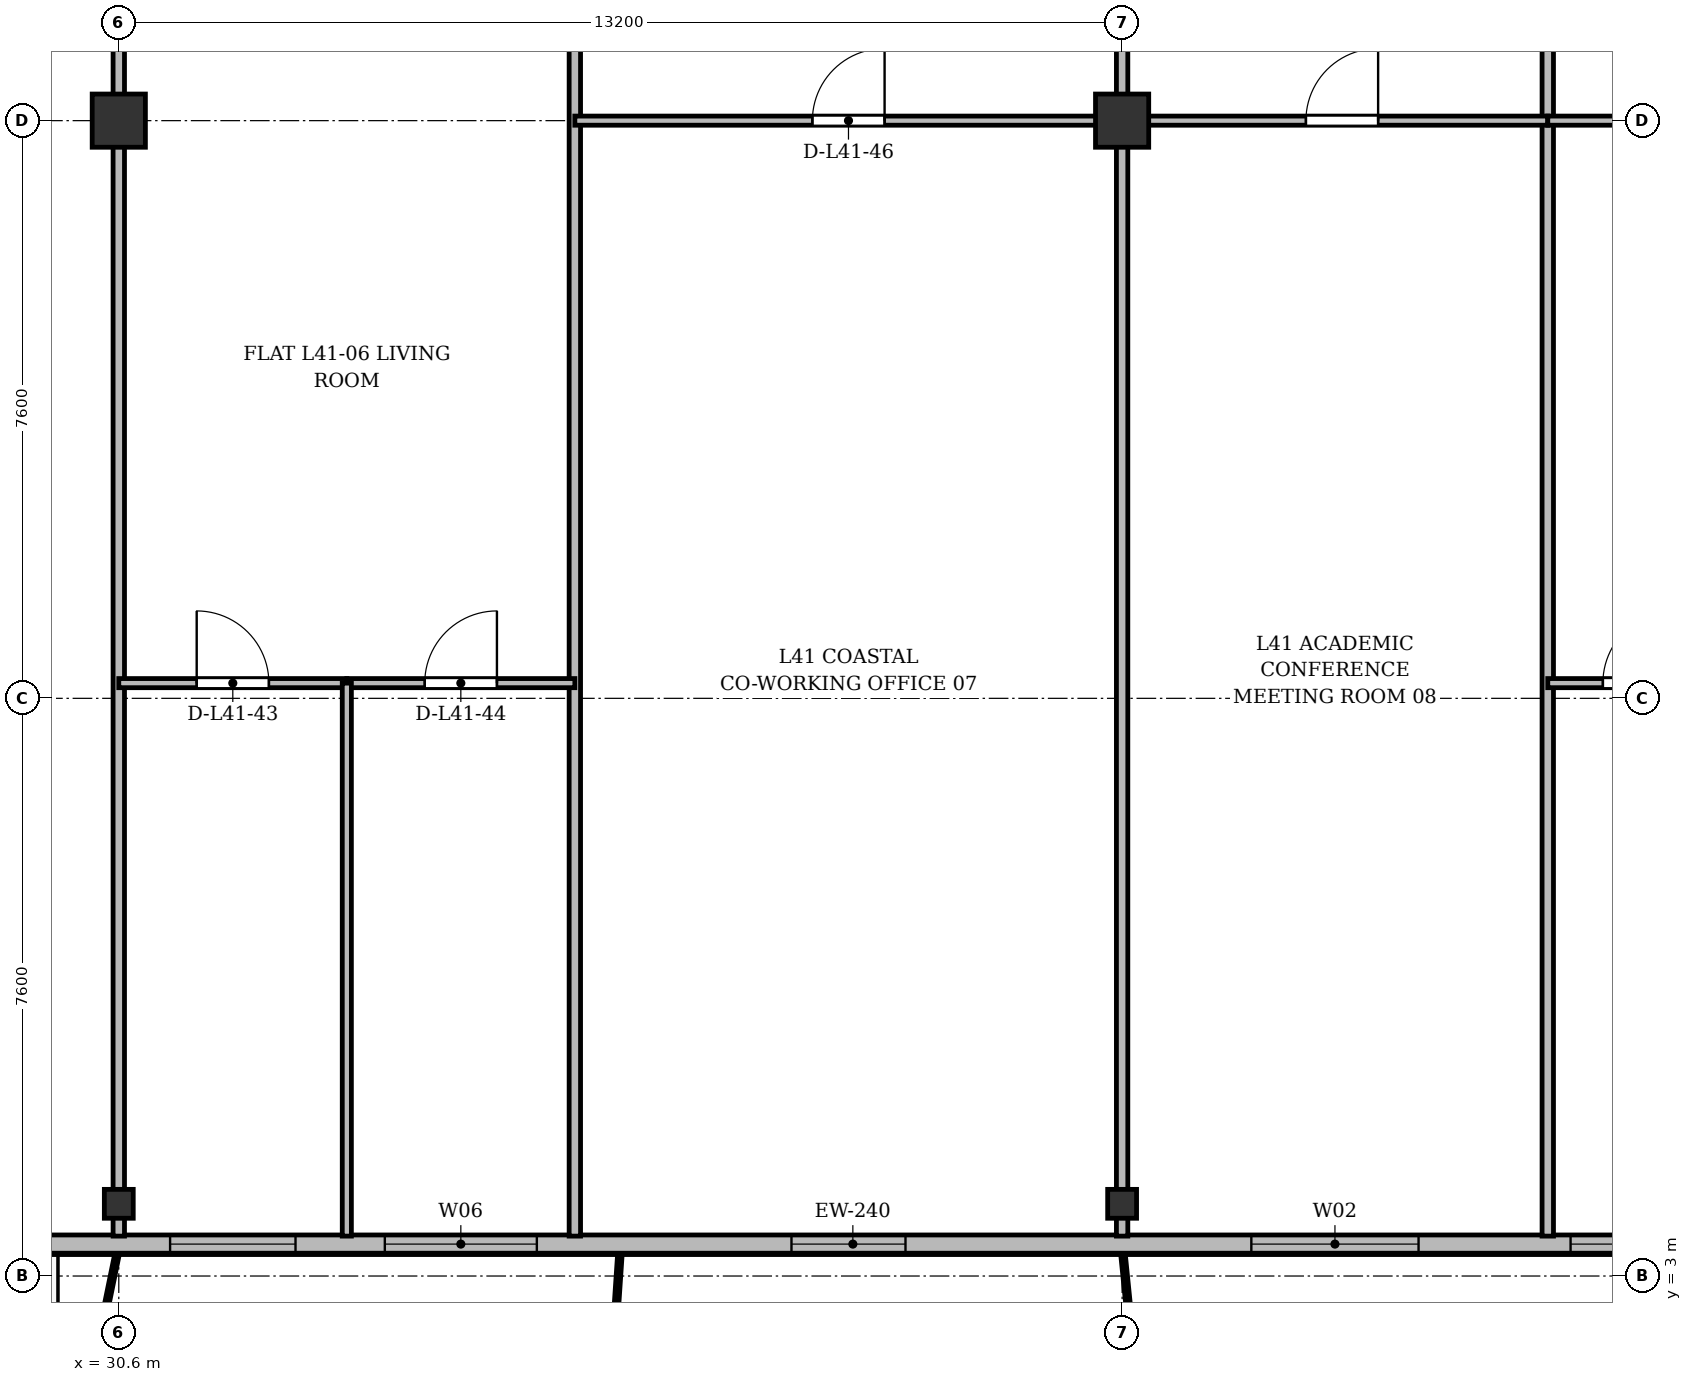
"""IFC4 building model, lengths in metres.
Left out: names, types, materials, properties, quantities, classifications, styles, units other than length and angle.
Written with IfcOpenShell. Run it as: python <this file> out.ifc"""

import sys

from ifc_helpers import new_model, si_unit, direction, frame, frame_2d, origin, origin_2d, place, context, subcontext, project, spatial, rectangle, i_section, extrude, source, transform, mapped, element, fill, save


model = new_model("IFC4")
c1 = context("Model", 3, precision=1e-05, world=origin(), true_north=direction((0.0, 1.0)))
c2 = subcontext(c1, "Body", "Model", "MODEL_VIEW")
j1 = project(units=[si_unit("LENGTHUNIT", "METRE"), si_unit("PLANEANGLEUNIT", "RADIAN")], contexts=[c1])
p1 = place(None, origin())
s1 = spatial("IfcSite", under=j1, at=p1, CompositionType="ELEMENT")
p2 = place(p1, origin())
s2 = spatial("IfcBuilding", under=s1, at=p2, CompositionType="ELEMENT")
p3 = place(p2, frame((0.0, 0.0, 157.3)))
s3 = spatial("IfcBuildingStorey", under=s2, at=p3, CompositionType="ELEMENT", Elevation=157.3)
m1 = source(origin(), c2, "Body", "SweptSolid", [
    extrude(i_section(OverallWidth=0.38, OverallDepth=0.38, WebThickness=0.02, FlangeThickness=0.03, at=origin_2d()), origin(), (0.0, 0.0, 1.0), 3.6),
])
p4 = place(p3, frame((30.6, 3.95, 0.0), z_axis=(0.0, 0.0, 1.0), x_axis=(1.0, 0.0, 0.0)))
e1 = element("IfcColumn", 1, at=p4, inside=s3, PredefinedType="COLUMN", context=c2, shape_type="MappedRepresentation", body=[
    mapped(m1, transform((0.0, 0.0, 0.0), x_axis=(1.0, 0.0, 0.0), y_axis=(0.0, 1.0, 0.0), z_axis=(0.0, 0.0, 1.0), scale=1.0)),
])
m2 = source(origin(), c2, "Body", "SweptSolid", [
    extrude(rectangle(XDim=0.7, YDim=0.7, at=origin_2d()), origin(), (0.0, 0.0, 1.0), 3.6),
])
p5 = place(p3, frame((30.6, 18.2, 0.0), z_axis=(0.0, 0.0, 1.0), x_axis=(1.0, 0.0, 0.0)))
e2 = element("IfcColumn", 2, at=p5, inside=s3, PredefinedType="COLUMN", context=c2, shape_type="MappedRepresentation", body=[
    mapped(m2, transform((0.0, 0.0, 0.0), x_axis=(1.0, 0.0, 0.0), y_axis=(0.0, 1.0, 0.0), z_axis=(0.0, 0.0, 1.0), scale=1.0)),
])
p6 = place(p3, frame((43.8, 3.95, 0.0), z_axis=(0.0, 0.0, 1.0), x_axis=(1.0, 0.0, 0.0)))
e3 = element("IfcColumn", 3, at=p6, inside=s3, PredefinedType="COLUMN", context=c2, shape_type="MappedRepresentation", body=[
    mapped(m1, transform((0.0, 0.0, 0.0), x_axis=(1.0, 0.0, 0.0), y_axis=(0.0, 1.0, 0.0), z_axis=(0.0, 0.0, 1.0), scale=1.0)),
])
p7 = place(p3, frame((43.8, 18.2, 0.0), z_axis=(0.0, 0.0, 1.0), x_axis=(1.0, 0.0, 0.0)))
e4 = element("IfcColumn", 4, at=p7, inside=s3, PredefinedType="COLUMN", context=c2, shape_type="MappedRepresentation", body=[
    mapped(m2, transform((0.0, 0.0, 0.0), x_axis=(1.0, 0.0, 0.0), y_axis=(0.0, 1.0, 0.0), z_axis=(0.0, 0.0, 1.0), scale=1.0)),
])
p8 = place(p3, frame((63.6, 3.42, 0.0), z_axis=(0.0, 0.0, 1.0), x_axis=(-1.0, 0.0, 0.0)))
e5 = element("IfcWall", 5, at=p8, inside=s3, PredefinedType="SOLIDWALL", context=c2, shape_type="SweptSolid", body=[
    extrude(rectangle(XDim=52.8, YDim=0.24, at=frame_2d((26.4, 0.0))), origin(), (0.0, 0.0, 1.0), 3.35),
])
p9 = place(p8, frame((0.295, 0.0, 0.9)))
e6 = element("IfcOpeningElement", 6, at=p9, cuts=e5, PredefinedType="OPENING", context=c2, shape_type="SweptSolid", body=[
    extrude(rectangle(XDim=1.5, YDim=1.75, at=frame_2d((0.75, 0.875))), frame((0.0, 0.13, 0.0), z_axis=(0.0, -1.0, 0.0), x_axis=(1.0, 0.0, 0.0)), (0.0, 0.0, 1.0), 0.26),
])
p10 = place(p8, frame((3.95, 0.0, 0.9)))
e7 = element("IfcOpeningElement", 7, at=p10, cuts=e5, PredefinedType="OPENING", context=c2, shape_type="SweptSolid", body=[
    extrude(rectangle(XDim=1.5, YDim=1.75, at=frame_2d((0.75, 0.875))), frame((0.0, 0.13, 0.0), z_axis=(0.0, -1.0, 0.0), x_axis=(1.0, 0.0, 0.0)), (0.0, 0.0, 1.0), 0.26),
])
p11 = place(p8, frame((7.635, 0.0, 0.0)))
e8 = element("IfcOpeningElement", 8, at=p11, cuts=e5, PredefinedType="OPENING", context=c2, shape_type="SweptSolid", body=[
    extrude(rectangle(XDim=1.2, YDim=2.2, at=frame_2d((0.6, 1.1))), frame((0.0, 0.13, 0.0), z_axis=(0.0, -1.0, 0.0), x_axis=(1.0, 0.0, 0.0)), (0.0, 0.0, 1.0), 0.26),
])
p12 = place(p8, frame((9.775, 0.0, 0.9)))
e9 = element("IfcOpeningElement", 9, at=p12, cuts=e5, PredefinedType="OPENING", context=c2, shape_type="SweptSolid", body=[
    extrude(rectangle(XDim=1.65, YDim=1.85, at=frame_2d((0.825, 0.925))), frame((0.0, 0.13, 0.0), z_axis=(0.0, -1.0, 0.0), x_axis=(1.0, 0.0, 0.0)), (0.0, 0.0, 1.0), 0.26),
])
p13 = place(p8, frame((12.1, 0.0, 0.9)))
e10 = element("IfcOpeningElement", 10, at=p13, cuts=e5, PredefinedType="OPENING", context=c2, shape_type="SweptSolid", body=[
    extrude(rectangle(XDim=1.8, YDim=1.8, at=frame_2d((0.9, 0.9))), frame((0.0, 0.13, 0.0), z_axis=(0.0, -1.0, 0.0), x_axis=(1.0, 0.0, 0.0)), (0.0, 0.0, 1.0), 0.26),
])
p14 = place(p8, frame((15.9, 0.0, 0.9)))
e11 = element("IfcOpeningElement", 11, at=p14, cuts=e5, PredefinedType="OPENING", context=c2, shape_type="SweptSolid", body=[
    extrude(rectangle(XDim=2.2, YDim=1.8, at=frame_2d((1.1, 0.9))), frame((0.0, 0.13, 0.0), z_axis=(0.0, -1.0, 0.0), x_axis=(1.0, 0.0, 0.0)), (0.0, 0.0, 1.0), 0.26),
])
p15 = place(p8, frame((22.65, 0.0, 0.9)))
e12 = element("IfcOpeningElement", 12, at=p15, cuts=e5, PredefinedType="OPENING", context=c2, shape_type="SweptSolid", body=[
    extrude(rectangle(XDim=1.5, YDim=1.75, at=frame_2d((0.75, 0.875))), frame((0.0, 0.13, 0.0), z_axis=(0.0, -1.0, 0.0), x_axis=(1.0, 0.0, 0.0)), (0.0, 0.0, 1.0), 0.26),
])
p16 = place(p8, frame((27.5, 0.0, 0.9)))
e13 = element("IfcOpeningElement", 13, at=p16, cuts=e5, PredefinedType="OPENING", context=c2, shape_type="SweptSolid", body=[
    extrude(rectangle(XDim=2.0, YDim=1.95, at=frame_2d((1.0, 0.975))), frame((0.0, 0.13, 0.0), z_axis=(0.0, -1.0, 0.0), x_axis=(1.0, 0.0, 0.0)), (0.0, 0.0, 1.0), 0.26),
])
p17 = place(p8, frame((30.675, 0.0, 0.9)))
e14 = element("IfcOpeningElement", 14, at=p17, cuts=e5, PredefinedType="OPENING", context=c2, shape_type="SweptSolid", body=[
    extrude(rectangle(XDim=1.65, YDim=1.85, at=frame_2d((0.825, 0.925))), frame((0.0, 0.13, 0.0), z_axis=(0.0, -1.0, 0.0), x_axis=(1.0, 0.0, 0.0)), (0.0, 0.0, 1.0), 0.26),
])
p18 = place(p8, frame((34.3, 0.0, 0.9)))
e15 = element("IfcOpeningElement", 15, at=p18, cuts=e5, PredefinedType="OPENING", context=c2, shape_type="SweptSolid", body=[
    extrude(rectangle(XDim=1.8, YDim=1.8, at=frame_2d((0.9, 0.9))), frame((0.0, 0.13, 0.0), z_axis=(0.0, -1.0, 0.0), x_axis=(1.0, 0.0, 0.0)), (0.0, 0.0, 1.0), 0.26),
])
p19 = place(p8, frame((39.3, 0.0, 0.9)))
e16 = element("IfcOpeningElement", 16, at=p19, cuts=e5, PredefinedType="OPENING", context=c2, shape_type="SweptSolid", body=[
    extrude(rectangle(XDim=2.2, YDim=1.8, at=frame_2d((1.1, 0.9))), frame((0.0, 0.13, 0.0), z_axis=(0.0, -1.0, 0.0), x_axis=(1.0, 0.0, 0.0)), (0.0, 0.0, 1.0), 0.26),
])
p20 = place(p8, frame((43.65, 0.0, 0.9)))
e17 = element("IfcOpeningElement", 17, at=p20, cuts=e5, PredefinedType="OPENING", context=c2, shape_type="SweptSolid", body=[
    extrude(rectangle(XDim=1.5, YDim=1.75, at=frame_2d((0.75, 0.875))), frame((0.0, 0.13, 0.0), z_axis=(0.0, -1.0, 0.0), x_axis=(1.0, 0.0, 0.0)), (0.0, 0.0, 1.0), 0.26),
])
p21 = place(p8, frame((47.1, 0.0, 0.9)))
e18 = element("IfcOpeningElement", 18, at=p21, cuts=e5, PredefinedType="OPENING", context=c2, shape_type="SweptSolid", body=[
    extrude(rectangle(XDim=2.0, YDim=1.95, at=frame_2d((1.0, 0.975))), frame((0.0, 0.13, 0.0), z_axis=(0.0, -1.0, 0.0), x_axis=(1.0, 0.0, 0.0)), (0.0, 0.0, 1.0), 0.26),
])
p22 = place(p8, frame((51.005, 0.0, 0.9)))
e19 = element("IfcOpeningElement", 19, at=p22, cuts=e5, PredefinedType="OPENING", context=c2, shape_type="SweptSolid", body=[
    extrude(rectangle(XDim=1.5, YDim=1.75, at=frame_2d((0.75, 0.875))), frame((0.0, 0.13, 0.0), z_axis=(0.0, -1.0, 0.0), x_axis=(1.0, 0.0, 0.0)), (0.0, 0.0, 1.0), 0.26),
])
p23 = place(p8, frame((37.85, 0.0, 0.0)))
e20 = element("IfcOpeningElement", 20, at=p23, cuts=e5, PredefinedType="OPENING", context=c2, shape_type="SweptSolid", body=[
    extrude(rectangle(XDim=1.2, YDim=2.2, at=frame_2d((0.6, 1.1))), frame((0.0, 0.13, 0.0), z_axis=(0.0, -1.0, 0.0), x_axis=(1.0, 0.0, 0.0)), (0.0, 0.0, 1.0), 0.26),
])
p24 = place(p3, frame((30.6, 3.525, 0.0), z_axis=(0.0, 0.0, 1.0), x_axis=(0.0, 1.0, 0.0)))
e21 = element("IfcWall", 21, at=p24, inside=s3, PredefinedType="PARTITIONING", context=c2, shape_type="SweptSolid", body=[
    extrude(rectangle(XDim=27.275, YDim=0.15, at=frame_2d((13.638, 0.0))), origin(), (0.0, 0.0, 1.0), 2.85),
])
p25 = place(p3, frame((36.6, 3.525, 0.0), z_axis=(0.0, 0.0, 1.0), x_axis=(0.0, 1.0, 0.0)))
e22 = element("IfcWall", 22, at=p25, inside=s3, PredefinedType="PARTITIONING", context=c2, shape_type="SweptSolid", body=[
    extrude(rectangle(XDim=27.275, YDim=0.15, at=frame_2d((13.638, 0.0))), origin(), (0.0, 0.0, 1.0), 2.75),
])
p26 = place(p3, frame((43.8, 3.525, 0.0), z_axis=(0.0, 0.0, 1.0), x_axis=(0.0, 1.0, 0.0)))
e23 = element("IfcWall", 23, at=p26, inside=s3, PredefinedType="PARTITIONING", context=c2, shape_type="SweptSolid", body=[
    extrude(rectangle(XDim=27.275, YDim=0.15, at=frame_2d((13.638, 0.0))), origin(), (0.0, 0.0, 1.0), 2.85),
])
p27 = place(p3, frame((49.4, 3.525, 0.0), z_axis=(0.0, 0.0, 1.0), x_axis=(0.0, 1.0, 0.0)))
e24 = element("IfcWall", 24, at=p27, inside=s3, PredefinedType="PARTITIONING", context=c2, shape_type="SweptSolid", body=[
    extrude(rectangle(XDim=27.275, YDim=0.15, at=frame_2d((13.638, 0.0))), origin(), (0.0, 0.0, 1.0), 2.75),
])
p28 = place(p3, frame((30.6, 10.8, 0.0), z_axis=(0.0, 0.0, 1.0), x_axis=(1.0, 0.0, 0.0)))
e25 = element("IfcWall", 25, at=p28, inside=s3, PredefinedType="PARTITIONING", context=c2, shape_type="SweptSolid", body=[
    extrude(rectangle(XDim=3.0, YDim=0.12, at=frame_2d((1.5, 0.0))), origin(), (0.0, 0.0, 1.0), 2.85),
])
p29 = place(p28, frame((1.025, 0.0, 0.0)))
e26 = element("IfcOpeningElement", 26, at=p29, cuts=e25, PredefinedType="OPENING", context=c2, shape_type="SweptSolid", body=[
    extrude(rectangle(XDim=0.95, YDim=2.15, at=frame_2d((0.475, 1.075))), frame((0.0, 0.07, 0.0), z_axis=(0.0, -1.0, 0.0), x_axis=(1.0, 0.0, 0.0)), (0.0, 0.0, 1.0), 0.14),
])
p30 = place(p3, frame((33.6, 10.8, 0.0), z_axis=(0.0, 0.0, 1.0), x_axis=(1.0, 0.0, 0.0)))
e27 = element("IfcWall", 27, at=p30, inside=s3, PredefinedType="PARTITIONING", context=c2, shape_type="SweptSolid", body=[
    extrude(rectangle(XDim=3.0, YDim=0.12, at=frame_2d((1.5, 0.0))), origin(), (0.0, 0.0, 1.0), 3.35),
])
p31 = place(p30, frame((1.025, 0.0, 0.0)))
e28 = element("IfcOpeningElement", 28, at=p31, cuts=e27, PredefinedType="OPENING", context=c2, shape_type="SweptSolid", body=[
    extrude(rectangle(XDim=0.95, YDim=2.15, at=frame_2d((0.475, 1.075))), frame((0.0, 0.07, 0.0), z_axis=(0.0, -1.0, 0.0), x_axis=(1.0, 0.0, 0.0)), (0.0, 0.0, 1.0), 0.14),
])
p32 = place(p3, frame((33.6, 3.525, 0.0), z_axis=(0.0, 0.0, 1.0), x_axis=(0.0, 1.0, 0.0)))
e29 = element("IfcWall", 29, at=p32, inside=s3, PredefinedType="PARTITIONING", context=c2, shape_type="SweptSolid", body=[
    extrude(rectangle(XDim=7.275, YDim=0.12, at=frame_2d((3.638, 0.0))), origin(), (0.0, 0.0, 1.0), 2.75),
])
p33 = place(p3, frame((36.6, 18.2, 0.0), z_axis=(0.0, 0.0, 1.0), x_axis=(1.0, 0.0, 0.0)))
e30 = element("IfcWall", 30, at=p33, inside=s3, PredefinedType="PARTITIONING", context=c2, shape_type="SweptSolid", body=[
    extrude(rectangle(XDim=7.2, YDim=0.12, at=frame_2d((3.6, 0.0))), origin(), (0.0, 0.0, 1.0), 2.75),
])
p34 = place(p33, frame((3.125, 0.0, 0.0)))
e31 = element("IfcOpeningElement", 31, at=p34, cuts=e30, PredefinedType="OPENING", context=c2, shape_type="SweptSolid", body=[
    extrude(rectangle(XDim=0.95, YDim=2.15, at=frame_2d((0.475, 1.075))), frame((0.0, 0.07, 0.0), z_axis=(0.0, -1.0, 0.0), x_axis=(1.0, 0.0, 0.0)), (0.0, 0.0, 1.0), 0.14),
])
p35 = place(p3, frame((43.8, 18.2, 0.0), z_axis=(0.0, 0.0, 1.0), x_axis=(1.0, 0.0, 0.0)))
e32 = element("IfcWall", 32, at=p35, inside=s3, PredefinedType="PARTITIONING", context=c2, shape_type="SweptSolid", body=[
    extrude(rectangle(XDim=5.6, YDim=0.12, at=frame_2d((2.8, 0.0))), origin(), (0.0, 0.0, 1.0), 2.75),
])
p36 = place(p35, frame((2.418, 0.0, 0.0)))
e33 = element("IfcOpeningElement", 33, at=p36, cuts=e32, PredefinedType="OPENING", context=c2, shape_type="SweptSolid", body=[
    extrude(rectangle(XDim=0.95, YDim=2.15, at=frame_2d((0.475, 1.075))), frame((0.0, 0.07, 0.0), z_axis=(0.0, -1.0, 0.0), x_axis=(1.0, 0.0, 0.0)), (0.0, 0.0, 1.0), 0.14),
])
p37 = place(p3, frame((49.4, 18.2, 0.0), z_axis=(0.0, 0.0, 1.0), x_axis=(1.0, 0.0, 0.0)))
e34 = element("IfcWall", 34, at=p37, inside=s3, PredefinedType="PARTITIONING", context=c2, shape_type="SweptSolid", body=[
    extrude(rectangle(XDim=4.8, YDim=0.12, at=frame_2d((2.4, 0.0))), origin(), (0.0, 0.0, 1.0), 2.75),
])
p38 = place(p37, frame((2.561, 0.0, 0.0)))
e35 = element("IfcOpeningElement", 35, at=p38, cuts=e34, PredefinedType="OPENING", context=c2, shape_type="SweptSolid", body=[
    extrude(rectangle(XDim=0.95, YDim=2.15, at=frame_2d((0.475, 1.075))), frame((0.0, 0.07, 0.0), z_axis=(0.0, -1.0, 0.0), x_axis=(1.0, 0.0, 0.0)), (0.0, 0.0, 1.0), 0.14),
])
p39 = place(p3, frame((49.4, 10.8, 0.0), z_axis=(0.0, 0.0, 1.0), x_axis=(1.0, 0.0, 0.0)))
e36 = element("IfcWall", 36, at=p39, inside=s3, PredefinedType="PARTITIONING", context=c2, shape_type="SweptSolid", body=[
    extrude(rectangle(XDim=2.4, YDim=0.12, at=frame_2d((1.2, 0.0))), origin(), (0.0, 0.0, 1.0), 2.85),
])
p40 = place(p39, frame((0.725, 0.0, 0.0)))
e37 = element("IfcOpeningElement", 37, at=p40, cuts=e36, PredefinedType="OPENING", context=c2, shape_type="SweptSolid", body=[
    extrude(rectangle(XDim=0.95, YDim=2.15, at=frame_2d((0.475, 1.075))), frame((0.0, 0.07, 0.0), z_axis=(0.0, -1.0, 0.0), x_axis=(1.0, 0.0, 0.0)), (0.0, 0.0, 1.0), 0.14),
])
m3 = source(origin(), c2, "Body", "SweptSolid", [
    extrude(rectangle(XDim=1.8, YDim=1.8, at=frame_2d((0.9, 0.9))), frame((0.0, 0.03, 0.0), z_axis=(0.0, -1.0, 0.0), x_axis=(1.0, 0.0, 0.0)), (0.0, 0.0, 1.0), 0.06),
])
p41 = place(p13, origin())
e38 = element("IfcWindow", 38, at=p41, inside=s3, PartitioningType="SINGLE_PANEL", PredefinedType="WINDOW", context=c2, shape_type="MappedRepresentation", body=[
    mapped(m3, transform((0.0, 0.0, 0.0), x_axis=(1.0, 0.0, 0.0), y_axis=(0.0, 1.0, 0.0), z_axis=(0.0, 0.0, 1.0), scale=1.0)),
])
fill(e10, e38)
m4 = source(origin(), c2, "Body", "SweptSolid", [
    extrude(rectangle(XDim=2.2, YDim=1.8, at=frame_2d((1.1, 0.9))), frame((0.0, 0.03, 0.0), z_axis=(0.0, -1.0, 0.0), x_axis=(1.0, 0.0, 0.0)), (0.0, 0.0, 1.0), 0.06),
])
p42 = place(p14, origin())
e39 = element("IfcWindow", 39, at=p42, inside=s3, PartitioningType="SINGLE_PANEL", PredefinedType="WINDOW", context=c2, shape_type="MappedRepresentation", body=[
    mapped(m4, transform((0.0, 0.0, 0.0), x_axis=(1.0, 0.0, 0.0), y_axis=(0.0, 1.0, 0.0), z_axis=(0.0, 0.0, 1.0), scale=1.0)),
])
fill(e11, e39)
m5 = source(origin(), c2, "Body", "SweptSolid", [
    extrude(rectangle(XDim=1.5, YDim=1.75, at=frame_2d((0.75, 0.875))), frame((0.0, 0.03, 0.0), z_axis=(0.0, -1.0, 0.0), x_axis=(1.0, 0.0, 0.0)), (0.0, 0.0, 1.0), 0.06),
])
p43 = place(p15, origin())
e40 = element("IfcWindow", 40, at=p43, inside=s3, PartitioningType="SINGLE_PANEL", PredefinedType="WINDOW", context=c2, shape_type="MappedRepresentation", body=[
    mapped(m5, transform((0.0, 0.0, 0.0), x_axis=(1.0, 0.0, 0.0), y_axis=(0.0, 1.0, 0.0), z_axis=(0.0, 0.0, 1.0), scale=1.0)),
])
fill(e12, e40)
m6 = source(origin(), c2, "Body", "SweptSolid", [
    extrude(rectangle(XDim=2.0, YDim=1.95, at=frame_2d((1.0, 0.975))), frame((0.0, 0.03, 0.0), z_axis=(0.0, -1.0, 0.0), x_axis=(1.0, 0.0, 0.0)), (0.0, 0.0, 1.0), 0.06),
])
p44 = place(p16, origin())
e41 = element("IfcWindow", 41, at=p44, inside=s3, PartitioningType="SINGLE_PANEL", PredefinedType="WINDOW", context=c2, shape_type="MappedRepresentation", body=[
    mapped(m6, transform((0.0, 0.0, 0.0), x_axis=(1.0, 0.0, 0.0), y_axis=(0.0, 1.0, 0.0), z_axis=(0.0, 0.0, 1.0), scale=1.0)),
])
fill(e13, e41)
m7 = source(origin(), c2, "Body", "SweptSolid", [
    extrude(rectangle(XDim=1.65, YDim=1.85, at=frame_2d((0.825, 0.925))), frame((0.0, 0.03, 0.0), z_axis=(0.0, -1.0, 0.0), x_axis=(1.0, 0.0, 0.0)), (0.0, 0.0, 1.0), 0.06),
])
p45 = place(p17, origin())
e42 = element("IfcWindow", 42, at=p45, inside=s3, PartitioningType="SINGLE_PANEL", PredefinedType="WINDOW", context=c2, shape_type="MappedRepresentation", body=[
    mapped(m7, transform((0.0, 0.0, 0.0), x_axis=(1.0, 0.0, 0.0), y_axis=(0.0, 1.0, 0.0), z_axis=(0.0, 0.0, 1.0), scale=1.0)),
])
fill(e14, e42)
m8 = source(origin(), c2, "Body", "SweptSolid", [
    extrude(rectangle(XDim=0.95, YDim=2.15, at=frame_2d((0.475, 1.075))), frame((0.0, 0.025, 0.0), z_axis=(0.0, -1.0, 0.0), x_axis=(1.0, 0.0, 0.0)), (0.0, 0.0, 1.0), 0.05),
])
p46 = place(p29, origin())
e43 = element("IfcDoor", 43, at=p46, inside=s3, OperationType="SINGLE_SWING_LEFT", PredefinedType="DOOR", context=c2, shape_type="MappedRepresentation", body=[
    mapped(m8, transform((0.0, 0.0, 0.0), x_axis=(1.0, 0.0, 0.0), y_axis=(0.0, 1.0, 0.0), z_axis=(0.0, 0.0, 1.0), scale=1.0)),
])
fill(e26, e43)
p47 = place(p31, origin())
e44 = element("IfcDoor", 44, at=p47, inside=s3, OperationType="SINGLE_SWING_RIGHT", PredefinedType="DOOR", context=c2, shape_type="MappedRepresentation", body=[
    mapped(m8, transform((0.0, 0.0, 0.0), x_axis=(1.0, 0.0, 0.0), y_axis=(0.0, 1.0, 0.0), z_axis=(0.0, 0.0, 1.0), scale=1.0)),
])
fill(e28, e44)
p48 = place(p34, origin())
e45 = element("IfcDoor", 45, at=p48, inside=s3, OperationType="SINGLE_SWING_RIGHT", PredefinedType="DOOR", context=c2, shape_type="MappedRepresentation", body=[
    mapped(m8, transform((0.0, 0.0, 0.0), x_axis=(1.0, 0.0, 0.0), y_axis=(0.0, 1.0, 0.0), z_axis=(0.0, 0.0, 1.0), scale=1.0)),
])
fill(e31, e45)
p49 = place(p36, origin())
e46 = element("IfcDoor", 46, at=p49, inside=s3, OperationType="SINGLE_SWING_RIGHT", PredefinedType="DOOR", context=c2, shape_type="MappedRepresentation", body=[
    mapped(m8, transform((0.0, 0.0, 0.0), x_axis=(1.0, 0.0, 0.0), y_axis=(0.0, 1.0, 0.0), z_axis=(0.0, 0.0, 1.0), scale=1.0)),
])
fill(e33, e46)
p50 = place(p40, origin())
e47 = element("IfcDoor", 47, at=p50, inside=s3, OperationType="SINGLE_SWING_RIGHT", PredefinedType="DOOR", context=c2, shape_type="MappedRepresentation", body=[
    mapped(m8, transform((0.0, 0.0, 0.0), x_axis=(1.0, 0.0, 0.0), y_axis=(0.0, 1.0, 0.0), z_axis=(0.0, 0.0, 1.0), scale=1.0)),
])
fill(e37, e47)
save(model, sys.argv[1])
